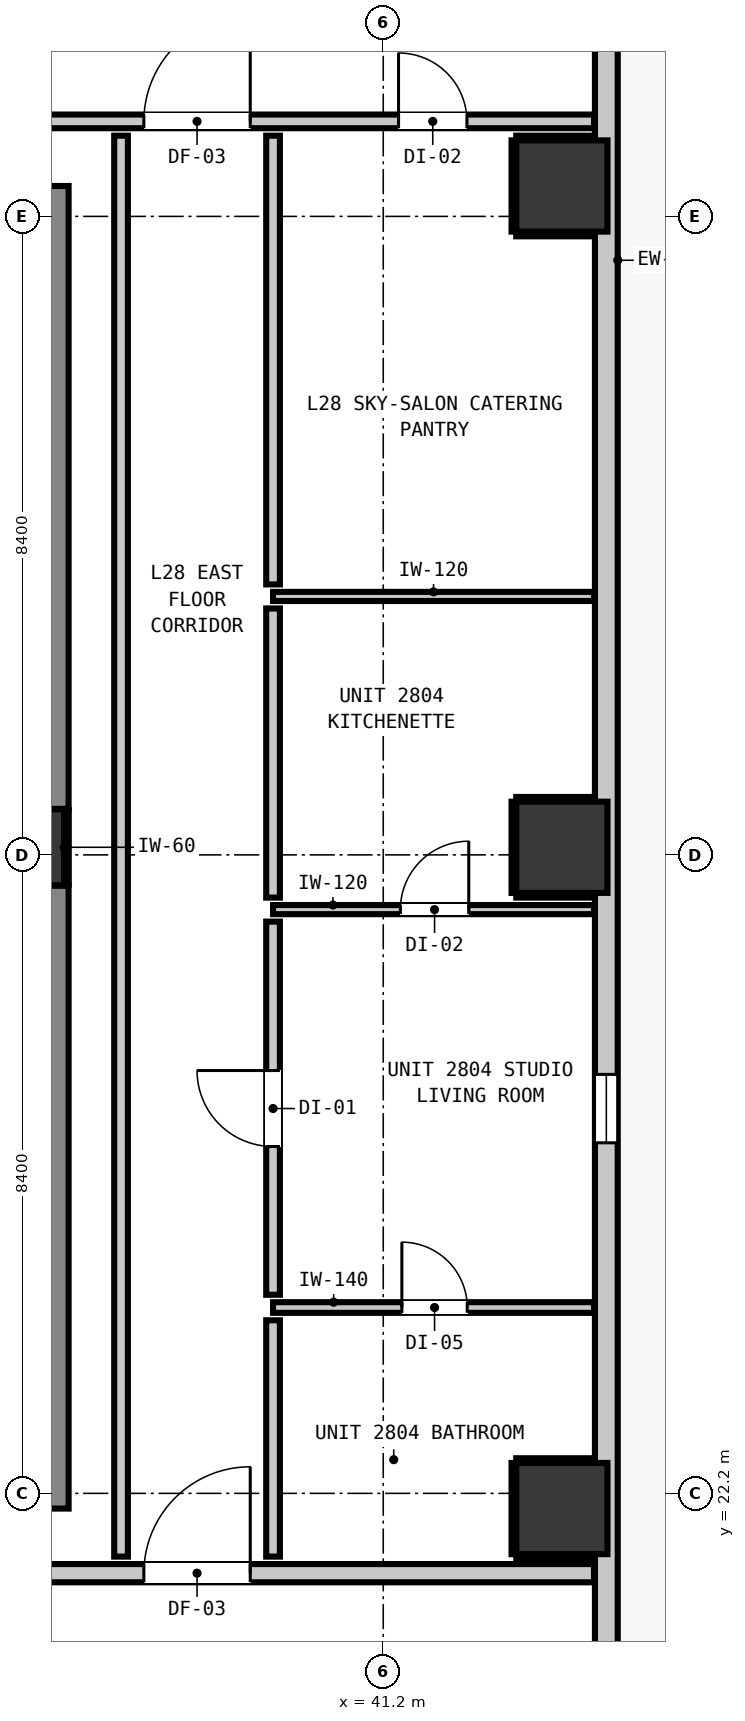
"""IFC4 building model, lengths in metres.
Left out: names, types, materials, properties, quantities, classifications, styles, units other than length and angle.
Written with IfcOpenShell. Run it as: python <this file> out.ifc"""

import sys

from ifc_helpers import new_model, si_unit, direction, frame, frame_2d, origin, origin_2d, place, context, subcontext, project, spatial, rectangle, extrude, element, fill, save


model = new_model("IFC4")
c1 = context("Model", 3, precision=1e-05, world=origin(), true_north=direction((0.0, 1.0)))
c2 = subcontext(c1, "Body", "Model", "MODEL_VIEW")
j1 = project(units=[si_unit("LENGTHUNIT", "METRE"), si_unit("PLANEANGLEUNIT", "RADIAN")], contexts=[c1])
p1 = place(None, origin())
s1 = spatial("IfcSite", under=j1, at=p1, CompositionType="ELEMENT")
p2 = place(p1, origin())
s2 = spatial("IfcBuilding", under=s1, at=p2, CompositionType="ELEMENT")
p3 = place(p2, frame((0.0, 0.0, 99.44)))
s3 = spatial("IfcBuildingStorey", under=s2, at=p3, CompositionType="ELEMENT", Elevation=99.44)
p4 = place(p3, frame((36.5, 30.7, 0.0), z_axis=(0.0, 0.0, 1.0), x_axis=(1.0, 0.0, 0.0)))
e1 = element("IfcColumn", 1, at=p4, inside=s3, PredefinedType="COLUMN", context=c2, shape_type="SweptSolid", body=[
    extrude(rectangle(XDim=1.0, YDim=1.0, at=origin_2d()), origin(), (0.0, 0.0, 1.0), 3.32),
])
p5 = place(p3, frame((36.56, 22.0, 0.0), z_axis=(0.0, 0.0, 1.0), x_axis=(0.0, 1.0, 0.0)))
e2 = element("IfcWall", 2, at=p5, inside=s3, PredefinedType="SHEAR", context=c2, shape_type="SweptSolid", body=[
    extrude(rectangle(XDim=8.195, YDim=1.0, at=frame_2d((4.098, 0.0))), origin(), (0.0, 0.0, 1.0), 3.32),
])
p6 = place(p3, frame((36.56, 31.205, 0.0), z_axis=(0.0, 0.0, 1.0), x_axis=(0.0, 1.0, 0.0)))
e3 = element("IfcWall", 3, at=p6, inside=s3, PredefinedType="SHEAR", context=c2, shape_type="SweptSolid", body=[
    extrude(rectangle(XDim=8.195, YDim=1.0, at=frame_2d((4.097, 0.0))), origin(), (0.0, 0.0, 1.0), 3.32),
])
for number, where, z_axis, x_axis in (
    (4, (43.55, 22.0, 0.0), (0.0, 0.0, 1.0), (1.0, 0.0, 0.0)),
    (5, (43.55, 30.7, 0.0), (0.0, 0.0, 1.0), (1.0, 0.0, 0.0)),
    (6, (43.55, 39.4, 0.0), (0.0, 0.0, 1.0), (1.0, 0.0, 0.0)),
):
    element("IfcColumn", number, at=place(p3, frame(where, z_axis=z_axis, x_axis=x_axis)), inside=s3, PredefinedType="COLUMN", context=c2, shape_type="SweptSolid", body=[
        extrude(rectangle(XDim=1.2, YDim=1.2, at=origin_2d()), origin(), (0.0, 0.0, 1.0), 3.32),
    ])
p7 = place(p3, frame((44.135, 51.035, 0.0), z_axis=(0.0, 0.0, 1.0), x_axis=(0.0, -1.0, 0.0)))
e7 = element("IfcWall", 7, at=p7, inside=s3, PredefinedType="STANDARD", context=c2, shape_type="SweptSolid", body=[
    extrude(rectangle(XDim=34.67, YDim=0.3, at=frame_2d((17.335, 0.0))), origin(), (0.0, 0.0, 1.0), 3.06),
])
p8 = place(p7, frame((0.901, 0.0, 0.0)))
e8 = element("IfcOpeningElement", 8, at=p8, cuts=e7, PredefinedType="OPENING", context=c2, shape_type="SweptSolid", body=[
    extrude(rectangle(XDim=1.0, YDim=2.15, at=frame_2d((0.5, 1.075))), frame((0.0, 0.16, 0.0), z_axis=(0.0, -1.0, 0.0), x_axis=(1.0, 0.0, 0.0)), (0.0, 0.0, 1.0), 0.32),
])
p9 = place(p7, frame((32.682, 0.0, 0.85)))
e9 = element("IfcOpeningElement", 9, at=p9, cuts=e7, PredefinedType="OPENING", context=c2, shape_type="SweptSolid", body=[
    extrude(rectangle(XDim=0.9, YDim=1.5, at=frame_2d((0.45, 0.75))), frame((0.0, 0.16, 0.0), z_axis=(0.0, -1.0, 0.0), x_axis=(1.0, 0.0, 0.0)), (0.0, 0.0, 1.0), 0.32),
])
p10 = place(p7, frame((23.323, 0.0, 0.85)))
e10 = element("IfcOpeningElement", 10, at=p10, cuts=e7, PredefinedType="OPENING", context=c2, shape_type="SweptSolid", body=[
    extrude(rectangle(XDim=0.9, YDim=1.5, at=frame_2d((0.45, 0.75))), frame((0.0, 0.16, 0.0), z_axis=(0.0, -1.0, 0.0), x_axis=(1.0, 0.0, 0.0)), (0.0, 0.0, 1.0), 0.32),
])
p11 = place(p3, frame((12.993, 21.15, 0.0), z_axis=(0.0, 0.0, 1.0), x_axis=(1.0, 0.0, 0.0)))
e11 = element("IfcWall", 11, at=p11, inside=s3, PredefinedType="PARTITIONING", context=c2, shape_type="SweptSolid", body=[
    extrude(rectangle(XDim=30.98, YDim=0.24, at=frame_2d((15.49, 0.0))), origin(), (0.0, 0.0, 1.0), 3.06),
])
p12 = place(p11, frame((5.217, 0.0, 0.0)))
e12 = element("IfcOpeningElement", 12, at=p12, cuts=e11, PredefinedType="OPENING", context=c2, shape_type="SweptSolid", body=[
    extrude(rectangle(XDim=1.1, YDim=2.15, at=frame_2d((0.55, 1.075))), frame((0.0, 0.13, 0.0), z_axis=(0.0, -1.0, 0.0), x_axis=(1.0, 0.0, 0.0)), (0.0, 0.0, 1.0), 0.26),
])
p13 = place(p11, frame((25.057, 0.0, 0.0)))
e13 = element("IfcOpeningElement", 13, at=p13, cuts=e11, PredefinedType="OPENING", context=c2, shape_type="SweptSolid", body=[
    extrude(rectangle(XDim=1.4, YDim=2.15, at=frame_2d((0.7, 1.075))), frame((0.0, 0.13, 0.0), z_axis=(0.0, -1.0, 0.0), x_axis=(1.0, 0.0, 0.0)), (0.0, 0.0, 1.0), 0.26),
])
p14 = place(p3, frame((1.827, 40.25, 0.0), z_axis=(0.0, 0.0, 1.0), x_axis=(1.0, 0.0, 0.0)))
e14 = element("IfcWall", 14, at=p14, inside=s3, PredefinedType="PARTITIONING", context=c2, shape_type="SweptSolid", body=[
    extrude(rectangle(XDim=42.146, YDim=0.18, at=frame_2d((21.073, 0.0))), origin(), (0.0, 0.0, 1.0), 3.06),
])
p15 = place(p14, frame((15.608, 0.0, 0.0)))
e15 = element("IfcOpeningElement", 15, at=p15, cuts=e14, PredefinedType="OPENING", context=c2, shape_type="SweptSolid", body=[
    extrude(rectangle(XDim=1.4, YDim=2.15, at=frame_2d((0.7, 1.075))), frame((0.0, 0.1, 0.0), z_axis=(0.0, -1.0, 0.0), x_axis=(1.0, 0.0, 0.0)), (0.0, 0.0, 1.0), 0.2),
])
p16 = place(p14, frame((8.623, 0.0, 0.0)))
e16 = element("IfcOpeningElement", 16, at=p16, cuts=e14, PredefinedType="OPENING", context=c2, shape_type="SweptSolid", body=[
    extrude(rectangle(XDim=1.4, YDim=2.15, at=frame_2d((0.7, 1.075))), frame((0.0, 0.1, 0.0), z_axis=(0.0, -1.0, 0.0), x_axis=(1.0, 0.0, 0.0)), (0.0, 0.0, 1.0), 0.2),
])
p17 = place(p14, frame((36.223, 0.0, 0.0)))
e17 = element("IfcOpeningElement", 17, at=p17, cuts=e14, PredefinedType="OPENING", context=c2, shape_type="SweptSolid", body=[
    extrude(rectangle(XDim=1.4, YDim=2.15, at=frame_2d((0.7, 1.075))), frame((0.0, 0.1, 0.0), z_axis=(0.0, -1.0, 0.0), x_axis=(1.0, 0.0, 0.0)), (0.0, 0.0, 1.0), 0.2),
])
p18 = place(p14, frame((3.697, 0.0, 0.0)))
e18 = element("IfcOpeningElement", 18, at=p18, cuts=e14, PredefinedType="OPENING", context=c2, shape_type="SweptSolid", body=[
    extrude(rectangle(XDim=0.95, YDim=2.1, at=frame_2d((0.475, 1.05))), frame((0.0, 0.1, 0.0), z_axis=(0.0, -1.0, 0.0), x_axis=(1.0, 0.0, 0.0)), (0.0, 0.0, 1.0), 0.2),
])
p19 = place(p14, frame((39.574, 0.0, 0.0)))
e19 = element("IfcOpeningElement", 19, at=p19, cuts=e14, PredefinedType="OPENING", context=c2, shape_type="SweptSolid", body=[
    extrude(rectangle(XDim=0.9, YDim=2.1, at=frame_2d((0.45, 1.05))), frame((0.0, 0.1, 0.0), z_axis=(0.0, -1.0, 0.0), x_axis=(1.0, 0.0, 0.0)), (0.0, 0.0, 1.0), 0.2),
])
p20 = place(p3, frame((39.75, 24.645, 0.0), z_axis=(0.0, 0.0, 1.0), x_axis=(1.0, 0.0, 0.0)))
e20 = element("IfcWall", 20, at=p20, inside=s3, PredefinedType="PARTITIONING", context=c2, shape_type="SweptSolid", body=[
    extrude(rectangle(XDim=4.223, YDim=0.14, at=frame_2d((2.111, 0.0))), origin(), (0.0, 0.0, 1.0), 3.06),
])
p21 = place(p20, frame((1.695, 0.0, 0.0)))
e21 = element("IfcOpeningElement", 21, at=p21, cuts=e20, PredefinedType="OPENING", context=c2, shape_type="SweptSolid", body=[
    extrude(rectangle(XDim=0.86, YDim=2.02, at=frame_2d((0.43, 1.01))), frame((0.0, 0.08, 0.0), z_axis=(0.0, -1.0, 0.0), x_axis=(1.0, 0.0, 0.0)), (0.0, 0.0, 1.0), 0.16),
])
p22 = place(p3, frame((39.75, 29.88, 0.0), z_axis=(0.0, 0.0, 1.0), x_axis=(1.0, 0.0, 0.0)))
e22 = element("IfcWall", 22, at=p22, inside=s3, PredefinedType="PARTITIONING", context=c2, shape_type="SweptSolid", body=[
    extrude(rectangle(XDim=4.223, YDim=0.12, at=frame_2d((2.111, 0.0))), origin(), (0.0, 0.0, 1.0), 3.06),
])
p23 = place(p22, frame((1.675, 0.0, 0.0)))
e23 = element("IfcOpeningElement", 23, at=p23, cuts=e22, PredefinedType="OPENING", context=c2, shape_type="SweptSolid", body=[
    extrude(rectangle(XDim=0.9, YDim=2.1, at=frame_2d((0.45, 1.05))), frame((0.0, 0.07, 0.0), z_axis=(0.0, -1.0, 0.0), x_axis=(1.0, 0.0, 0.0)), (0.0, 0.0, 1.0), 0.14),
])
p24 = place(p3, frame((39.75, 34.0, 0.0), z_axis=(0.0, 0.0, 1.0), x_axis=(1.0, 0.0, 0.0)))
e24 = element("IfcWall", 24, at=p24, inside=s3, PredefinedType="PARTITIONING", context=c2, shape_type="SweptSolid", body=[
    extrude(rectangle(XDim=4.223, YDim=0.12, at=frame_2d((2.111, 0.0))), origin(), (0.0, 0.0, 1.0), 3.06),
])
p25 = place(p3, frame((37.75, 21.368, 0.0), z_axis=(0.0, 0.0, 1.0), x_axis=(0.0, 1.0, 0.0)))
e25 = element("IfcWall", 25, at=p25, inside=s3, PredefinedType="PARTITIONING", context=c2, shape_type="SweptSolid", body=[
    extrude(rectangle(XDim=18.694, YDim=0.18, at=frame_2d((9.347, 0.0))), origin(), (0.0, 0.0, 1.0), 3.06),
])
p26 = place(p3, frame((39.75, 21.368, 0.0), z_axis=(0.0, 0.0, 1.0), x_axis=(0.0, 1.0, 0.0)))
e26 = element("IfcWall", 26, at=p26, inside=s3, PredefinedType="PARTITIONING", context=c2, shape_type="SweptSolid", body=[
    extrude(rectangle(XDim=3.109, YDim=0.18, at=frame_2d((1.555, 0.0))), origin(), (0.0, 0.0, 1.0), 3.06),
])
p27 = place(p3, frame((39.75, 24.813, 0.0), z_axis=(0.0, 0.0, 1.0), x_axis=(0.0, 1.0, 0.0)))
e27 = element("IfcWall", 27, at=p27, inside=s3, PredefinedType="PARTITIONING", context=c2, shape_type="SweptSolid", body=[
    extrude(rectangle(XDim=4.909, YDim=0.18, at=frame_2d((2.455, 0.0))), origin(), (0.0, 0.0, 1.0), 3.06),
])
p28 = place(p27, frame((1.95, 0.0, 0.0)))
e28 = element("IfcOpeningElement", 28, at=p28, cuts=e27, PredefinedType="OPENING", context=c2, shape_type="SweptSolid", body=[
    extrude(rectangle(XDim=1.0, YDim=2.15, at=frame_2d((0.5, 1.075))), frame((0.0, 0.1, 0.0), z_axis=(0.0, -1.0, 0.0), x_axis=(1.0, 0.0, 0.0)), (0.0, 0.0, 1.0), 0.2),
])
p29 = place(p3, frame((39.75, 30.038, 0.0), z_axis=(0.0, 0.0, 1.0), x_axis=(0.0, 1.0, 0.0)))
e29 = element("IfcWall", 29, at=p29, inside=s3, PredefinedType="PARTITIONING", context=c2, shape_type="SweptSolid", body=[
    extrude(rectangle(XDim=3.804, YDim=0.18, at=frame_2d((1.902, 0.0))), origin(), (0.0, 0.0, 1.0), 3.06),
])
p30 = place(p3, frame((39.75, 34.158, 0.0), z_axis=(0.0, 0.0, 1.0), x_axis=(0.0, 1.0, 0.0)))
e30 = element("IfcWall", 30, at=p30, inside=s3, PredefinedType="PARTITIONING", context=c2, shape_type="SweptSolid", body=[
    extrude(rectangle(XDim=5.904, YDim=0.18, at=frame_2d((2.952, 0.0))), origin(), (0.0, 0.0, 1.0), 3.06),
])
p31 = place(p3, frame((37.032, 30.21, 0.0), z_axis=(0.0, 0.0, 1.0), x_axis=(0.0, 1.0, 0.0)))
e31 = element("IfcWall", 31, at=p31, inside=s3, PredefinedType="PARTITIONING", context=c2, shape_type="SweptSolid", body=[
    extrude(rectangle(XDim=0.98, YDim=0.06, at=frame_2d((0.49, 0.0))), origin(), (0.0, 0.0, 1.0), 1.45),
])
for number, where, z_axis, x_axis in (
    (32, (42.95, 21.368, 0.0), (0.0, 0.0, 1.0), (1.0, 0.0, 0.0)),
    (33, (42.95, 22.632, 0.0), (0.0, 0.0, 1.0), (1.0, 0.0, 0.0)),
):
    element("IfcWall", number, at=place(p3, frame(where, z_axis=z_axis, x_axis=x_axis)), inside=s3, PredefinedType="PARTITIONING", context=c2, shape_type="SweptSolid", body=[
        extrude(rectangle(XDim=1.02, YDim=0.06, at=frame_2d((0.51, 0.0))), origin(), (0.0, 0.0, 1.0), 1.45),
    ])
p32 = place(p3, frame((42.918, 21.4, 0.0), z_axis=(0.0, 0.0, 1.0), x_axis=(0.0, 1.0, 0.0)))
e34 = element("IfcWall", 34, at=p32, inside=s3, PredefinedType="PARTITIONING", context=c2, shape_type="SweptSolid", body=[
    extrude(rectangle(XDim=1.2, YDim=0.06, at=frame_2d((0.6, 0.0))), origin(), (0.0, 0.0, 1.0), 1.45),
])
for number, where, z_axis, x_axis in (
    (35, (42.95, 30.068, 0.0), (0.0, 0.0, 1.0), (1.0, 0.0, 0.0)),
    (36, (42.95, 31.332, 0.0), (0.0, 0.0, 1.0), (1.0, 0.0, 0.0)),
):
    element("IfcWall", number, at=place(p3, frame(where, z_axis=z_axis, x_axis=x_axis)), inside=s3, PredefinedType="PARTITIONING", context=c2, shape_type="SweptSolid", body=[
        extrude(rectangle(XDim=1.02, YDim=0.06, at=frame_2d((0.51, 0.0))), origin(), (0.0, 0.0, 1.0), 1.45),
    ])
p33 = place(p3, frame((42.918, 30.1, 0.0), z_axis=(0.0, 0.0, 1.0), x_axis=(0.0, 1.0, 0.0)))
e37 = element("IfcWall", 37, at=p33, inside=s3, PredefinedType="PARTITIONING", context=c2, shape_type="SweptSolid", body=[
    extrude(rectangle(XDim=1.2, YDim=0.06, at=frame_2d((0.6, 0.0))), origin(), (0.0, 0.0, 1.0), 1.45),
])
for number, where, z_axis, x_axis in (
    (38, (42.95, 38.768, 0.0), (0.0, 0.0, 1.0), (1.0, 0.0, 0.0)),
    (39, (42.95, 40.032, 0.0), (0.0, 0.0, 1.0), (1.0, 0.0, 0.0)),
):
    element("IfcWall", number, at=place(p3, frame(where, z_axis=z_axis, x_axis=x_axis)), inside=s3, PredefinedType="PARTITIONING", context=c2, shape_type="SweptSolid", body=[
        extrude(rectangle(XDim=1.02, YDim=0.06, at=frame_2d((0.51, 0.0))), origin(), (0.0, 0.0, 1.0), 1.45),
    ])
p34 = place(p3, frame((42.918, 38.8, 0.0), z_axis=(0.0, 0.0, 1.0), x_axis=(0.0, 1.0, 0.0)))
e40 = element("IfcWall", 40, at=p34, inside=s3, PredefinedType="PARTITIONING", context=c2, shape_type="SweptSolid", body=[
    extrude(rectangle(XDim=1.2, YDim=0.06, at=frame_2d((0.6, 0.0))), origin(), (0.0, 0.0, 1.0), 1.45),
])
p35 = place(p10, origin())
e41 = element("IfcWindow", 41, at=p35, inside=s3, PartitioningType="SINGLE_PANEL", PredefinedType="WINDOW", context=c2, shape_type="SweptSolid", body=[
    extrude(rectangle(XDim=0.9, YDim=1.5, at=frame_2d((0.45, 0.75))), frame((0.0, 0.03, 0.0), z_axis=(0.0, -1.0, 0.0), x_axis=(1.0, 0.0, 0.0)), (0.0, 0.0, 1.0), 0.06),
])
fill(e10, e41)
p36 = place(p13, origin())
e42 = element("IfcDoor", 42, at=p36, inside=s3, OperationType="SINGLE_SWING_RIGHT", PredefinedType="DOOR", context=c2, shape_type="SweptSolid", body=[
    extrude(rectangle(XDim=1.4, YDim=2.15, at=frame_2d((0.7, 1.075))), frame((0.0, 0.025, 0.0), z_axis=(0.0, -1.0, 0.0), x_axis=(1.0, 0.0, 0.0)), (0.0, 0.0, 1.0), 0.05),
])
fill(e13, e42)
p37 = place(p17, origin())
e43 = element("IfcDoor", 43, at=p37, inside=s3, OperationType="SINGLE_SWING_RIGHT", PredefinedType="DOOR", context=c2, shape_type="SweptSolid", body=[
    extrude(rectangle(XDim=1.4, YDim=2.15, at=frame_2d((0.7, 1.075))), frame((0.0, 0.025, 0.0), z_axis=(0.0, -1.0, 0.0), x_axis=(1.0, 0.0, 0.0)), (0.0, 0.0, 1.0), 0.05),
])
fill(e17, e43)
p38 = place(p28, origin())
e44 = element("IfcDoor", 44, at=p38, inside=s3, OperationType="SINGLE_SWING_RIGHT", PredefinedType="DOOR", context=c2, shape_type="SweptSolid", body=[
    extrude(rectangle(XDim=1.0, YDim=2.15, at=frame_2d((0.5, 1.075))), frame((0.0, 0.025, 0.0), z_axis=(0.0, -1.0, 0.0), x_axis=(1.0, 0.0, 0.0)), (0.0, 0.0, 1.0), 0.05),
])
fill(e28, e44)
p39 = place(p21, origin())
e45 = element("IfcDoor", 45, at=p39, inside=s3, OperationType="SINGLE_SWING_LEFT", PredefinedType="DOOR", context=c2, shape_type="SweptSolid", body=[
    extrude(rectangle(XDim=0.86, YDim=2.02, at=frame_2d((0.43, 1.01))), frame((0.0, 0.025, 0.0), z_axis=(0.0, -1.0, 0.0), x_axis=(1.0, 0.0, 0.0)), (0.0, 0.0, 1.0), 0.05),
])
fill(e21, e45)
p40 = place(p23, origin())
e46 = element("IfcDoor", 46, at=p40, inside=s3, OperationType="SINGLE_SWING_RIGHT", PredefinedType="DOOR", context=c2, shape_type="SweptSolid", body=[
    extrude(rectangle(XDim=0.9, YDim=2.1, at=frame_2d((0.45, 1.05))), frame((0.0, 0.025, 0.0), z_axis=(0.0, -1.0, 0.0), x_axis=(1.0, 0.0, 0.0)), (0.0, 0.0, 1.0), 0.05),
])
fill(e23, e46)
p41 = place(p19, origin())
e47 = element("IfcDoor", 47, at=p41, inside=s3, OperationType="SINGLE_SWING_LEFT", PredefinedType="DOOR", context=c2, shape_type="SweptSolid", body=[
    extrude(rectangle(XDim=0.9, YDim=2.1, at=frame_2d((0.45, 1.05))), frame((0.0, 0.025, 0.0), z_axis=(0.0, -1.0, 0.0), x_axis=(1.0, 0.0, 0.0)), (0.0, 0.0, 1.0), 0.05),
])
fill(e19, e47)
save(model, sys.argv[1])
